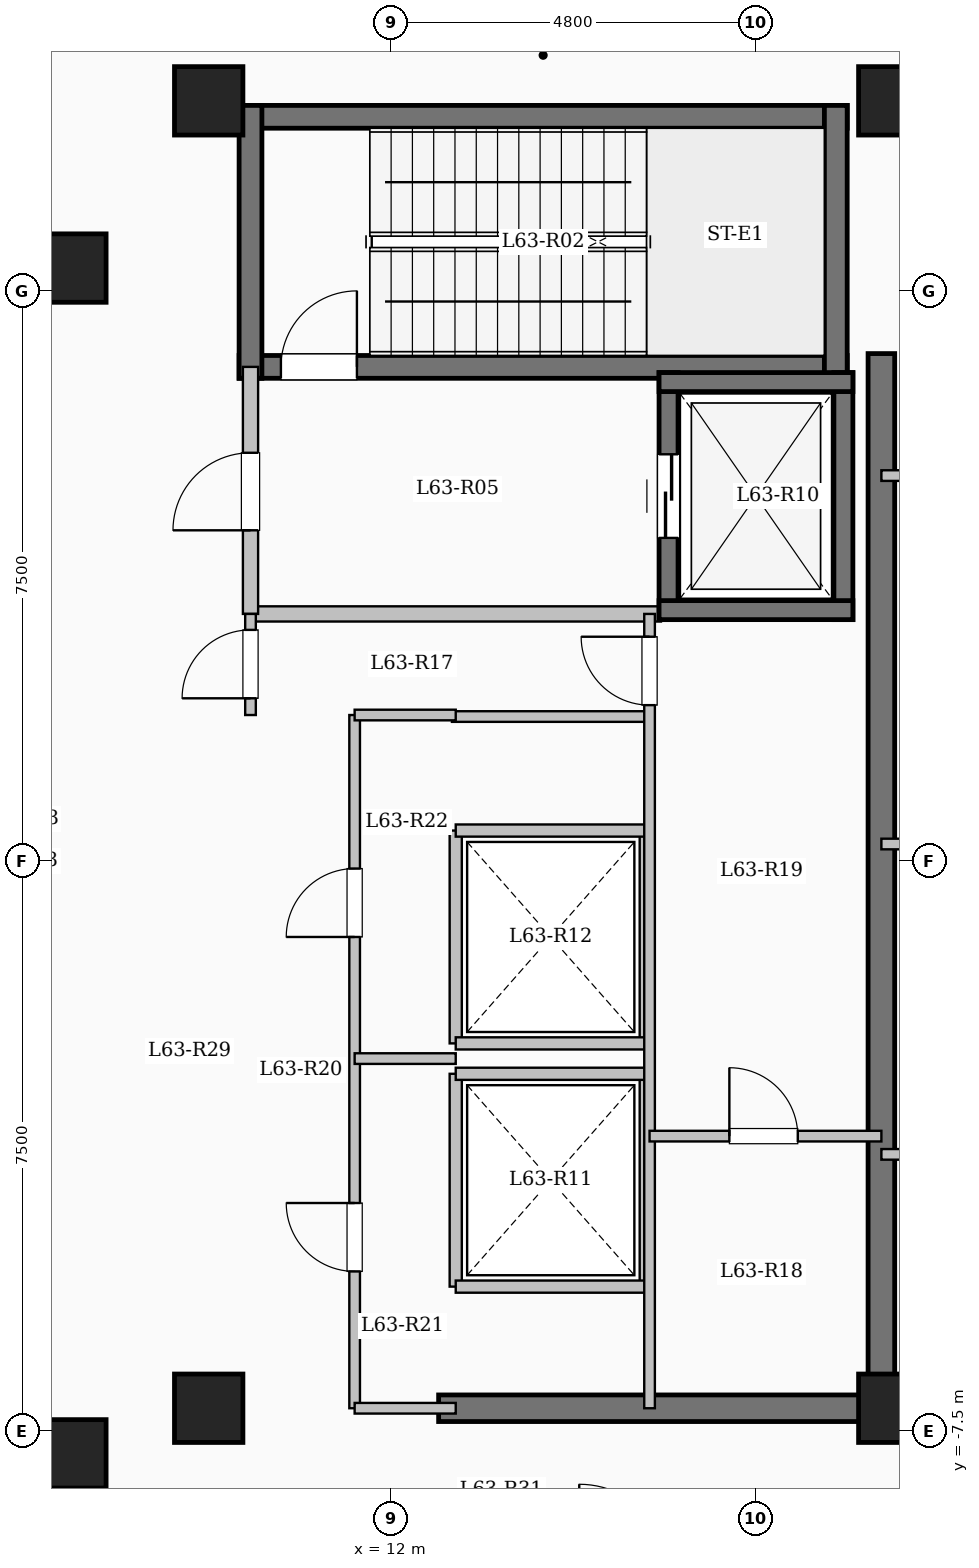
"""IFC4 building model, lengths in metres.
Left out: names, types, materials, properties, quantities, classifications, styles, units other than length and angle.
Written with IfcOpenShell. Run it as: python <this file> out.ifc"""

import sys

from ifc_helpers import new_model, si_unit, direction, frame, frame_2d, origin, origin_2d, place, context, subcontext, project, spatial, rectangle, extrude, element, fill, save


model = new_model("IFC4")
c1 = context("Model", 3, precision=1e-05, world=origin(), true_north=direction((0.0, 1.0)))
c2 = subcontext(c1, "Body", "Model", "MODEL_VIEW")
j1 = project(units=[si_unit("LENGTHUNIT", "METRE"), si_unit("PLANEANGLEUNIT", "RADIAN")], contexts=[c1])
p1 = place(None, origin())
s1 = spatial("IfcSite", under=j1, at=p1, CompositionType="ELEMENT")
p2 = place(p1, origin())
s2 = spatial("IfcBuilding", under=s1, at=p2, CompositionType="ELEMENT")
p3 = place(p2, frame((0.0, 0.0, 231.75)))
s3 = spatial("IfcBuildingStorey", under=s2, at=p3, CompositionType="ELEMENT", Elevation=231.75)
for number, where, z_axis, x_axis in (
    (1, (7.8, -7.8, 0.0), (0.0, 0.0, 1.0), (1.0, 0.0, 0.0)),
    (2, (7.8, 7.8, 0.0), (0.0, 0.0, 1.0), (1.0, 0.0, 0.0)),
    (3, (9.6, -7.2, 0.0), (0.0, 0.0, 1.0), (1.0, 0.0, 0.0)),
    (4, (9.6, 10.0, 0.0), (0.0, 0.0, 1.0), (1.0, 0.0, 0.0)),
    (5, (18.6, -7.2, 0.0), (0.0, 0.0, 1.0), (1.0, 0.0, 0.0)),
    (6, (18.6, 10.0, 0.0), (0.0, 0.0, 1.0), (1.0, 0.0, 0.0)),
):
    element("IfcColumn", number, at=place(p3, frame(where, z_axis=z_axis, x_axis=x_axis)), inside=s3, PredefinedType="COLUMN", context=c2, shape_type="SweptSolid", body=[
        extrude(rectangle(XDim=0.9, YDim=0.9, at=origin_2d()), origin(), (0.0, 0.0, 1.0), 4.65),
    ])
p4 = place(p3, frame((10.0, 9.79, 0.0), z_axis=(0.0, 0.0, 1.0), x_axis=(1.0, 0.0, 0.0)))
e7 = element("IfcWall", 7, at=p4, inside=s3, PredefinedType="SHEAR", context=c2, shape_type="SweptSolid", body=[
    extrude(rectangle(XDim=8.0, YDim=0.3, at=frame_2d((4.0, 0.0))), origin(), (0.0, 0.0, 1.0), 4.65),
])
p5 = place(p3, frame((10.0, 6.5, 0.0), z_axis=(0.0, 0.0, 1.0), x_axis=(1.0, 0.0, 0.0)))
e8 = element("IfcWall", 8, at=p5, inside=s3, PredefinedType="SHEAR", context=c2, shape_type="SweptSolid", body=[
    extrude(rectangle(XDim=8.0, YDim=0.3, at=frame_2d((4.0, 0.0))), origin(), (0.0, 0.0, 1.0), 4.65),
])
p6 = place(p5, frame((0.55, 0.0, 0.0)))
e9 = element("IfcOpeningElement", 9, at=p6, cuts=e8, PredefinedType="OPENING", context=c2, shape_type="SweptSolid", body=[
    extrude(rectangle(XDim=1.0, YDim=2.15, at=frame_2d((0.5, 1.075))), frame((0.0, 0.16, 0.0), z_axis=(0.0, -1.0, 0.0), x_axis=(1.0, 0.0, 0.0)), (0.0, 0.0, 1.0), 0.32),
])
for number, where, z_axis, x_axis in (
    (10, (10.15, 6.35, 0.0), (0.0, 0.0, 1.0), (0.0, 1.0, 0.0)),
    (11, (17.85, 6.35, 0.0), (0.0, 0.0, 1.0), (0.0, 1.0, 0.0)),
):
    element("IfcWall", number, at=place(p3, frame(where, z_axis=z_axis, x_axis=x_axis)), inside=s3, PredefinedType="SHEAR", context=c2, shape_type="SweptSolid", body=[
        extrude(rectangle(XDim=3.59, YDim=0.3, at=frame_2d((1.795, 0.0))), origin(), (0.0, 0.0, 1.0), 4.65),
    ])
p7 = place(p3, frame((10.15, 3.25, 0.0), z_axis=(0.0, 0.0, 1.0), x_axis=(1.0, 0.0, 0.0)))
e12 = element("IfcWall", 12, at=p7, inside=s3, PredefinedType="SOLIDWALL", context=c2, shape_type="SweptSolid", body=[
    extrude(rectangle(XDim=5.4, YDim=0.2, at=frame_2d((2.7, 0.0))), origin(), (0.0, 0.0, 1.0), 4.35),
])
p8 = place(p3, frame((10.15, 3.25, 0.0), z_axis=(0.0, 0.0, 1.0), x_axis=(0.0, 1.0, 0.0)))
e13 = element("IfcWall", 13, at=p8, inside=s3, PredefinedType="SOLIDWALL", context=c2, shape_type="SweptSolid", body=[
    extrude(rectangle(XDim=3.25, YDim=0.2, at=frame_2d((1.625, 0.0))), origin(), (0.0, 0.0, 1.0), 4.35),
])
p9 = place(p8, frame((1.1, 0.0, 0.0)))
e14 = element("IfcOpeningElement", 14, at=p9, cuts=e13, PredefinedType="OPENING", context=c2, shape_type="SweptSolid", body=[
    extrude(rectangle(XDim=1.02, YDim=2.15, at=frame_2d((0.51, 1.075))), frame((0.0, 0.11, 0.0), z_axis=(0.0, -1.0, 0.0), x_axis=(1.0, 0.0, 0.0)), (0.0, 0.0, 1.0), 0.22),
])
p10 = place(p3, frame((15.65, 3.175, 0.0), z_axis=(0.0, 0.0, 1.0), x_axis=(0.0, 1.0, 0.0)))
e15 = element("IfcWall", 15, at=p10, inside=s3, PredefinedType="SHEAR", context=c2, shape_type="SweptSolid", body=[
    extrude(rectangle(XDim=3.25, YDim=0.25, at=frame_2d((1.625, 0.0))), origin(), (0.0, 0.0, 1.0), 4.65),
])
p11 = place(p10, frame((1.075, 0.0, 0.0)))
e16 = element("IfcOpeningElement", 16, at=p11, cuts=e15, PredefinedType="OPENING", context=c2, shape_type="SweptSolid", body=[
    extrude(rectangle(XDim=1.1, YDim=2.15, at=frame_2d((0.55, 1.075))), frame((0.0, 0.135, 0.0), z_axis=(0.0, -1.0, 0.0), x_axis=(1.0, 0.0, 0.0)), (0.0, 0.0, 1.0), 0.27),
])
p12 = place(p3, frame((17.95, 3.175, 0.0), z_axis=(0.0, 0.0, 1.0), x_axis=(0.0, 1.0, 0.0)))
e17 = element("IfcWall", 17, at=p12, inside=s3, PredefinedType="SHEAR", context=c2, shape_type="SweptSolid", body=[
    extrude(rectangle(XDim=3.25, YDim=0.25, at=frame_2d((1.625, 0.0))), origin(), (0.0, 0.0, 1.0), 4.65),
])
for number, where, z_axis, x_axis in (
    (18, (15.525, 3.3, 0.0), (0.0, 0.0, 1.0), (1.0, 0.0, 0.0)),
    (19, (15.525, 6.3, 0.0), (0.0, 0.0, 1.0), (1.0, 0.0, 0.0)),
):
    element("IfcWall", number, at=place(p3, frame(where, z_axis=z_axis, x_axis=x_axis)), inside=s3, PredefinedType="SHEAR", context=c2, shape_type="SweptSolid", body=[
        extrude(rectangle(XDim=2.55, YDim=0.25, at=frame_2d((1.275, 0.0))), origin(), (0.0, 0.0, 1.0), 4.65),
    ])
for number, where, z_axis, x_axis in (
    (20, (12.85, -5.6, 0.0), (0.0, 0.0, 1.0), (0.0, 1.0, 0.0)),
    (21, (15.35, -5.6, 0.0), (0.0, 0.0, 1.0), (0.0, 1.0, 0.0)),
):
    element("IfcWall", number, at=place(p3, frame(where, z_axis=z_axis, x_axis=x_axis)), inside=s3, PredefinedType="SOLIDWALL", context=c2, shape_type="SweptSolid", body=[
        extrude(rectangle(XDim=2.8, YDim=0.16, at=frame_2d((1.4, 0.0))), origin(), (0.0, 0.0, 1.0), 4.35),
    ])
for number, where, z_axis, x_axis in (
    (22, (12.85, -5.6, 0.0), (0.0, 0.0, 1.0), (1.0, 0.0, 0.0)),
    (23, (12.85, -2.8, 0.0), (0.0, 0.0, 1.0), (1.0, 0.0, 0.0)),
):
    element("IfcWall", number, at=place(p3, frame(where, z_axis=z_axis, x_axis=x_axis)), inside=s3, PredefinedType="SOLIDWALL", context=c2, shape_type="SweptSolid", body=[
        extrude(rectangle(XDim=2.5, YDim=0.16, at=frame_2d((1.25, 0.0))), origin(), (0.0, 0.0, 1.0), 4.35),
    ])
for number, where, z_axis, x_axis in (
    (24, (12.85, -2.4, 0.0), (0.0, 0.0, 1.0), (0.0, 1.0, 0.0)),
    (25, (15.35, -2.4, 0.0), (0.0, 0.0, 1.0), (0.0, 1.0, 0.0)),
):
    element("IfcWall", number, at=place(p3, frame(where, z_axis=z_axis, x_axis=x_axis)), inside=s3, PredefinedType="SOLIDWALL", context=c2, shape_type="SweptSolid", body=[
        extrude(rectangle(XDim=2.8, YDim=0.16, at=frame_2d((1.4, 0.0))), origin(), (0.0, 0.0, 1.0), 4.35),
    ])
for number, where, z_axis, x_axis in (
    (26, (12.85, -2.4, 0.0), (0.0, 0.0, 1.0), (1.0, 0.0, 0.0)),
    (27, (12.85, 0.4, 0.0), (0.0, 0.0, 1.0), (1.0, 0.0, 0.0)),
):
    element("IfcWall", number, at=place(p3, frame(where, z_axis=z_axis, x_axis=x_axis)), inside=s3, PredefinedType="SOLIDWALL", context=c2, shape_type="SweptSolid", body=[
        extrude(rectangle(XDim=2.5, YDim=0.16, at=frame_2d((1.25, 0.0))), origin(), (0.0, 0.0, 1.0), 4.35),
    ])
p13 = place(p3, frame((18.45, -7.375, 0.0), z_axis=(0.0, 0.0, 1.0), x_axis=(0.0, 1.0, 0.0)))
e28 = element("IfcWall", 28, at=p13, inside=s3, PredefinedType="SHEAR", context=c2, shape_type="SweptSolid", body=[
    extrude(rectangle(XDim=14.05, YDim=0.35, at=frame_2d((7.025, 0.0))), origin(), (0.0, 0.0, 1.0), 4.65),
])
p14 = place(p3, frame((12.625, -7.2, 0.0), z_axis=(0.0, 0.0, 1.0), x_axis=(1.0, 0.0, 0.0)))
e29 = element("IfcWall", 29, at=p14, inside=s3, PredefinedType="SHEAR", context=c2, shape_type="SweptSolid", body=[
    extrude(rectangle(XDim=6.0, YDim=0.35, at=frame_2d((3.0, 0.0))), origin(), (0.0, 0.0, 1.0), 4.65),
])
p15 = place(p3, frame((12.8, 1.9, 0.0), z_axis=(0.0, 0.0, 1.0), x_axis=(1.0, 0.0, 0.0)))
e30 = element("IfcWall", 30, at=p15, inside=s3, PredefinedType="PARTITIONING", context=c2, shape_type="SweptSolid", body=[
    extrude(rectangle(XDim=2.6, YDim=0.14, at=frame_2d((1.3, 0.0))), origin(), (0.0, 0.0, 1.0), 4.35),
])
p16 = place(p3, frame((10.15, 1.92, 0.0), z_axis=(0.0, 0.0, 1.0), x_axis=(0.0, 1.0, 0.0)))
e31 = element("IfcWall", 31, at=p16, inside=s3, PredefinedType="PARTITIONING", context=c2, shape_type="SweptSolid", body=[
    extrude(rectangle(XDim=1.33, YDim=0.14, at=frame_2d((0.665, 0.0))), origin(), (0.0, 0.0, 1.0), 4.35),
])
p17 = place(p16, frame((0.22, 0.0, 0.0)))
e32 = element("IfcOpeningElement", 32, at=p17, cuts=e31, PredefinedType="OPENING", context=c2, shape_type="SweptSolid", body=[
    extrude(rectangle(XDim=0.9, YDim=2.08, at=frame_2d((0.45, 1.04))), frame((0.0, 0.08, 0.0), z_axis=(0.0, -1.0, 0.0), x_axis=(1.0, 0.0, 0.0)), (0.0, 0.0, 1.0), 0.16),
])
p18 = place(p3, frame((15.4, -7.2, 0.0), z_axis=(0.0, 0.0, 1.0), x_axis=(0.0, 1.0, 0.0)))
e33 = element("IfcWall", 33, at=p18, inside=s3, PredefinedType="PARTITIONING", context=c2, shape_type="SweptSolid", body=[
    extrude(rectangle(XDim=10.45, YDim=0.14, at=frame_2d((5.225, 0.0))), origin(), (0.0, 0.0, 1.0), 4.35),
])
p19 = place(p18, frame((9.25, 0.0, 0.0)))
e34 = element("IfcOpeningElement", 34, at=p19, cuts=e33, PredefinedType="OPENING", context=c2, shape_type="SweptSolid", body=[
    extrude(rectangle(XDim=0.9, YDim=2.08, at=frame_2d((0.45, 1.04))), frame((0.0, 0.08, 0.0), z_axis=(0.0, -1.0, 0.0), x_axis=(1.0, 0.0, 0.0)), (0.0, 0.0, 1.0), 0.16),
])
p20 = place(p3, frame((15.4, -3.62, 0.0), z_axis=(0.0, 0.0, 1.0), x_axis=(1.0, 0.0, 0.0)))
e35 = element("IfcWall", 35, at=p20, inside=s3, PredefinedType="PARTITIONING", context=c2, shape_type="SweptSolid", body=[
    extrude(rectangle(XDim=3.05, YDim=0.14, at=frame_2d((1.525, 0.0))), origin(), (0.0, 0.0, 1.0), 4.35),
])
p21 = place(p20, frame((1.05, 0.0, 0.0)))
e36 = element("IfcOpeningElement", 36, at=p21, cuts=e35, PredefinedType="OPENING", context=c2, shape_type="SweptSolid", body=[
    extrude(rectangle(XDim=0.9, YDim=2.08, at=frame_2d((0.45, 1.04))), frame((0.0, 0.08, 0.0), z_axis=(0.0, -1.0, 0.0), x_axis=(1.0, 0.0, 0.0)), (0.0, 0.0, 1.0), 0.16),
])
p22 = place(p3, frame((11.52, -7.2, 0.0), z_axis=(0.0, 0.0, 1.0), x_axis=(0.0, 1.0, 0.0)))
e37 = element("IfcWall", 37, at=p22, inside=s3, PredefinedType="PARTITIONING", context=c2, shape_type="SweptSolid", body=[
    extrude(rectangle(XDim=9.12, YDim=0.14, at=frame_2d((4.56, 0.0))), origin(), (0.0, 0.0, 1.0), 4.35),
])
p23 = place(p22, frame((1.8, 0.0, 0.0)))
e38 = element("IfcOpeningElement", 38, at=p23, cuts=e37, PredefinedType="OPENING", context=c2, shape_type="SweptSolid", body=[
    extrude(rectangle(XDim=0.9, YDim=2.08, at=frame_2d((0.45, 1.04))), frame((0.0, 0.08, 0.0), z_axis=(0.0, -1.0, 0.0), x_axis=(1.0, 0.0, 0.0)), (0.0, 0.0, 1.0), 0.16),
])
p24 = place(p22, frame((6.2, 0.0, 0.0)))
e39 = element("IfcOpeningElement", 39, at=p24, cuts=e37, PredefinedType="OPENING", context=c2, shape_type="SweptSolid", body=[
    extrude(rectangle(XDim=0.9, YDim=2.08, at=frame_2d((0.45, 1.04))), frame((0.0, 0.08, 0.0), z_axis=(0.0, -1.0, 0.0), x_axis=(1.0, 0.0, 0.0)), (0.0, 0.0, 1.0), 0.16),
])
p25 = place(p3, frame((11.52, 1.92, 0.0), z_axis=(0.0, 0.0, 1.0), x_axis=(1.0, 0.0, 0.0)))
e40 = element("IfcWall", 40, at=p25, inside=s3, PredefinedType="PARTITIONING", context=c2, shape_type="SweptSolid", body=[
    extrude(rectangle(XDim=1.33, YDim=0.14, at=frame_2d((0.665, 0.0))), origin(), (0.0, 0.0, 1.0), 4.35),
])
p26 = place(p3, frame((11.52, -7.2, 0.0), z_axis=(0.0, 0.0, 1.0), x_axis=(1.0, 0.0, 0.0)))
e41 = element("IfcWall", 41, at=p26, inside=s3, PredefinedType="PARTITIONING", context=c2, shape_type="SweptSolid", body=[
    extrude(rectangle(XDim=1.33, YDim=0.14, at=frame_2d((0.665, 0.0))), origin(), (0.0, 0.0, 1.0), 3.485),
])
p27 = place(p3, frame((11.52, -2.6, 0.0), z_axis=(0.0, 0.0, 1.0), x_axis=(1.0, 0.0, 0.0)))
e42 = element("IfcWall", 42, at=p27, inside=s3, PredefinedType="PARTITIONING", context=c2, shape_type="SweptSolid", body=[
    extrude(rectangle(XDim=1.33, YDim=0.14, at=frame_2d((0.665, 0.0))), origin(), (0.0, 0.0, 1.0), 4.35),
])
p28 = place(p3, frame((18.45, -7.25, 0.0), z_axis=(0.0, 0.0, 1.0), x_axis=(1.0, 0.0, 0.0)))
e43 = element("IfcWall", 43, at=p28, inside=s3, PredefinedType="PARTITIONING", context=c2, shape_type="SweptSolid", body=[
    extrude(rectangle(XDim=5.13, YDim=0.15, at=frame_2d((2.565, 0.0))), origin(), (0.0, 0.0, 1.0), 4.35),
])
p29 = place(p28, frame((1.95, 0.0, 0.0)))
e44 = element("IfcOpeningElement", 44, at=p29, cuts=e43, PredefinedType="OPENING", context=c2, shape_type="SweptSolid", body=[
    extrude(rectangle(XDim=1.08, YDim=2.15, at=frame_2d((0.54, 1.075))), frame((0.0, 0.085, 0.0), z_axis=(0.0, -1.0, 0.0), x_axis=(1.0, 0.0, 0.0)), (0.0, 0.0, 1.0), 0.17),
])
p30 = place(p3, frame((18.45, -3.86, 0.0), z_axis=(0.0, 0.0, 1.0), x_axis=(1.0, 0.0, 0.0)))
e45 = element("IfcWall", 45, at=p30, inside=s3, PredefinedType="PARTITIONING", context=c2, shape_type="SweptSolid", body=[
    extrude(rectangle(XDim=5.13, YDim=0.14, at=frame_2d((2.565, 0.0))), origin(), (0.0, 0.0, 1.0), 4.35),
])
p31 = place(p30, frame((0.9, 0.0, 0.0)))
e46 = element("IfcOpeningElement", 46, at=p31, cuts=e45, PredefinedType="OPENING", context=c2, shape_type="SweptSolid", body=[
    extrude(rectangle(XDim=1.08, YDim=2.15, at=frame_2d((0.54, 1.075))), frame((0.0, 0.08, 0.0), z_axis=(0.0, -1.0, 0.0), x_axis=(1.0, 0.0, 0.0)), (0.0, 0.0, 1.0), 0.16),
])
p32 = place(p3, frame((18.45, 0.223, 0.0), z_axis=(0.0, 0.0, 1.0), x_axis=(1.0, 0.0, 0.0)))
e47 = element("IfcWall", 47, at=p32, inside=s3, PredefinedType="PARTITIONING", context=c2, shape_type="SweptSolid", body=[
    extrude(rectangle(XDim=5.13, YDim=0.14, at=frame_2d((2.565, 0.0))), origin(), (0.0, 0.0, 1.0), 4.35),
])
p33 = place(p32, frame((0.9, 0.0, 0.0)))
e48 = element("IfcOpeningElement", 48, at=p33, cuts=e47, PredefinedType="OPENING", context=c2, shape_type="SweptSolid", body=[
    extrude(rectangle(XDim=1.08, YDim=2.15, at=frame_2d((0.54, 1.075))), frame((0.0, 0.08, 0.0), z_axis=(0.0, -1.0, 0.0), x_axis=(1.0, 0.0, 0.0)), (0.0, 0.0, 1.0), 0.16),
])
p34 = place(p3, frame((18.45, 5.07, 0.0), z_axis=(0.0, 0.0, 1.0), x_axis=(1.0, 0.0, 0.0)))
e49 = element("IfcWall", 49, at=p34, inside=s3, PredefinedType="PARTITIONING", context=c2, shape_type="SweptSolid", body=[
    extrude(rectangle(XDim=5.13, YDim=0.14, at=frame_2d((2.565, 0.0))), origin(), (0.0, 0.0, 1.0), 4.35),
])
p35 = place(p34, frame((0.9, 0.0, 0.0)))
e50 = element("IfcOpeningElement", 50, at=p35, cuts=e49, PredefinedType="OPENING", context=c2, shape_type="SweptSolid", body=[
    extrude(rectangle(XDim=1.08, YDim=2.15, at=frame_2d((0.54, 1.075))), frame((0.0, 0.08, 0.0), z_axis=(0.0, -1.0, 0.0), x_axis=(1.0, 0.0, 0.0)), (0.0, 0.0, 1.0), 0.16),
])
p36 = place(p6, origin())
e51 = element("IfcDoor", 51, at=p36, inside=s3, OperationType="SINGLE_SWING_RIGHT", PredefinedType="DOOR", context=c2, shape_type="SweptSolid", body=[
    extrude(rectangle(XDim=1.0, YDim=2.15, at=frame_2d((0.5, 1.075))), frame((0.0, 0.025, 0.0), z_axis=(0.0, -1.0, 0.0), x_axis=(1.0, 0.0, 0.0)), (0.0, 0.0, 1.0), 0.05),
])
fill(e9, e51)
p37 = place(p9, origin())
e52 = element("IfcDoor", 52, at=p37, inside=s3, OperationType="SINGLE_SWING_LEFT", PredefinedType="DOOR", context=c2, shape_type="SweptSolid", body=[
    extrude(rectangle(XDim=1.02, YDim=2.15, at=frame_2d((0.51, 1.075))), frame((0.0, 0.025, 0.0), z_axis=(0.0, -1.0, 0.0), x_axis=(1.0, 0.0, 0.0)), (0.0, 0.0, 1.0), 0.05),
])
fill(e14, e52)
p38 = place(p11, origin())
e53 = element("IfcDoor", 53, at=p38, inside=s3, OperationType="SLIDING_TO_LEFT", PredefinedType="DOOR", context=c2, shape_type="SweptSolid", body=[
    extrude(rectangle(XDim=1.1, YDim=2.15, at=frame_2d((0.55, 1.075))), frame((0.0, 0.025, 0.0), z_axis=(0.0, -1.0, 0.0), x_axis=(1.0, 0.0, 0.0)), (0.0, 0.0, 1.0), 0.05),
])
fill(e16, e53)
p39 = place(p17, origin())
e54 = element("IfcDoor", 54, at=p39, inside=s3, OperationType="SINGLE_SWING_LEFT", PredefinedType="DOOR", context=c2, shape_type="SweptSolid", body=[
    extrude(rectangle(XDim=0.9, YDim=2.08, at=frame_2d((0.45, 1.04))), frame((0.0, 0.025, 0.0), z_axis=(0.0, -1.0, 0.0), x_axis=(1.0, 0.0, 0.0)), (0.0, 0.0, 1.0), 0.05),
])
fill(e32, e54)
p40 = place(p19, origin())
e55 = element("IfcDoor", 55, at=p40, inside=s3, OperationType="SINGLE_SWING_RIGHT", PredefinedType="DOOR", context=c2, shape_type="SweptSolid", body=[
    extrude(rectangle(XDim=0.9, YDim=2.08, at=frame_2d((0.45, 1.04))), frame((0.0, 0.025, 0.0), z_axis=(0.0, -1.0, 0.0), x_axis=(1.0, 0.0, 0.0)), (0.0, 0.0, 1.0), 0.05),
])
fill(e34, e55)
p41 = place(p21, origin())
e56 = element("IfcDoor", 56, at=p41, inside=s3, OperationType="SINGLE_SWING_LEFT", PredefinedType="DOOR", context=c2, shape_type="SweptSolid", body=[
    extrude(rectangle(XDim=0.9, YDim=2.08, at=frame_2d((0.45, 1.04))), frame((0.0, 0.025, 0.0), z_axis=(0.0, -1.0, 0.0), x_axis=(1.0, 0.0, 0.0)), (0.0, 0.0, 1.0), 0.05),
])
fill(e36, e56)
p42 = place(p23, origin())
e57 = element("IfcDoor", 57, at=p42, inside=s3, OperationType="SINGLE_SWING_RIGHT", PredefinedType="DOOR", context=c2, shape_type="SweptSolid", body=[
    extrude(rectangle(XDim=0.9, YDim=2.08, at=frame_2d((0.45, 1.04))), frame((0.0, 0.025, 0.0), z_axis=(0.0, -1.0, 0.0), x_axis=(1.0, 0.0, 0.0)), (0.0, 0.0, 1.0), 0.05),
])
fill(e38, e57)
p43 = place(p24, origin())
e58 = element("IfcDoor", 58, at=p43, inside=s3, OperationType="SINGLE_SWING_LEFT", PredefinedType="DOOR", context=c2, shape_type="SweptSolid", body=[
    extrude(rectangle(XDim=0.9, YDim=2.08, at=frame_2d((0.45, 1.04))), frame((0.0, 0.025, 0.0), z_axis=(0.0, -1.0, 0.0), x_axis=(1.0, 0.0, 0.0)), (0.0, 0.0, 1.0), 0.05),
])
fill(e39, e58)
save(model, sys.argv[1])
